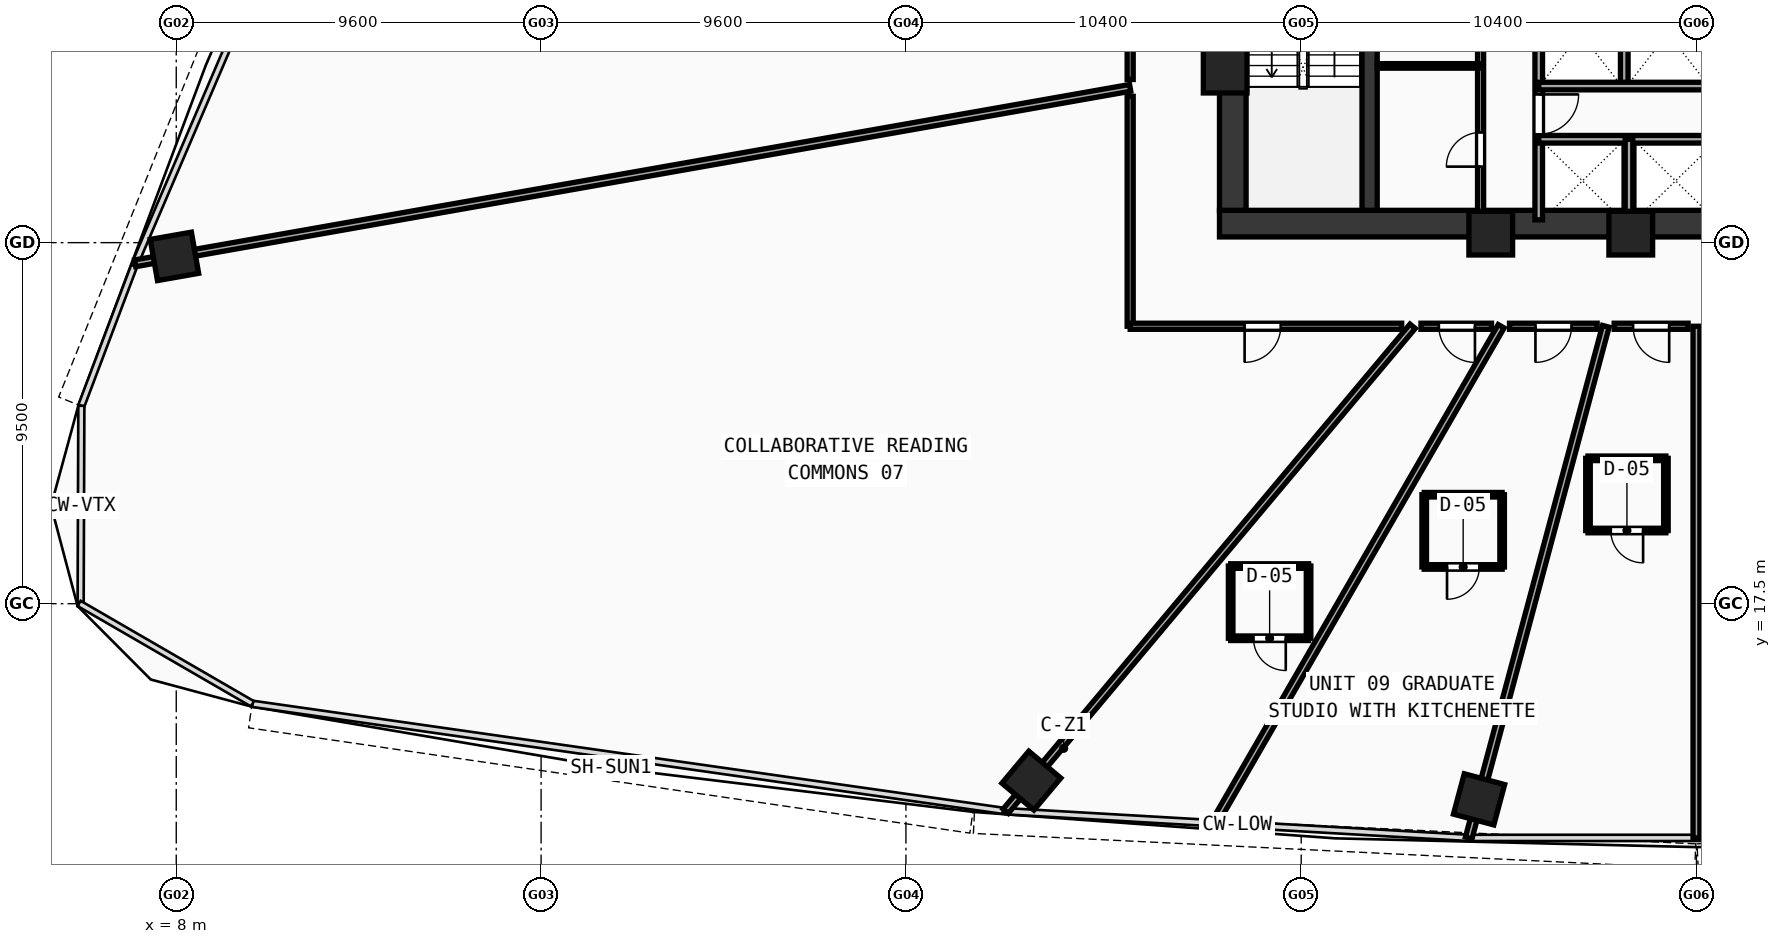
"""IFC4 building model, lengths in metres.
Left out: names, types, materials, properties, quantities, classifications, styles, units other than length and angle.
Written with IfcOpenShell. Run it as: python <this file> out.ifc"""

import sys

from ifc_helpers import new_model, si_unit, direction, frame, frame_2d, origin, origin_with_axes, origin_2d, place, context, subcontext, project, spatial, rectangle, hollow_rectangle, extrude, source, transform, mapped, element, fill, save


model = new_model("IFC4")
c1 = context("Model", 3, precision=1e-05, world=origin(), true_north=direction((0.0, 1.0)))
c2 = subcontext(c1, "Body", "Model", "MODEL_VIEW")
j1 = project(units=[si_unit("LENGTHUNIT", "METRE"), si_unit("PLANEANGLEUNIT", "RADIAN")], contexts=[c1])
p1 = place(None, origin())
s1 = spatial("IfcSite", under=j1, at=p1, CompositionType="ELEMENT")
p2 = place(p1, origin())
s2 = spatial("IfcBuilding", under=s1, at=p2, CompositionType="ELEMENT")
p3 = place(p2, frame((0.0, 0.0, 66.7)))
s3 = spatial("IfcBuildingStorey", under=s2, at=p3, CompositionType="ELEMENT", Elevation=66.7)
p4 = place(p3, frame((35.45, 27.5, 0.0), z_axis=(0.0, 0.0, 1.0), x_axis=(1.0, 0.0, 0.0)))
e1 = element("IfcWall", 1, at=p4, inside=s3, PredefinedType="SHEAR", context=c2, shape_type="SweptSolid", body=[
    extrude(rectangle(XDim=25.1, YDim=0.7, at=frame_2d((12.55, 0.0))), origin(), (0.0, 0.0, 1.0), 3.37),
])
p5 = place(p3, frame((35.8, 27.85, 0.0), z_axis=(0.0, 0.0, 1.0), x_axis=(0.0, 1.0, 0.0)))
e2 = element("IfcWall", 2, at=p5, inside=s3, PredefinedType="SHEAR", context=c2, shape_type="SweptSolid", body=[
    extrude(rectangle(XDim=12.0, YDim=0.7, at=frame_2d((6.0, 0.0))), origin(), (0.0, 0.0, 1.0), 3.37),
])
p6 = place(p3, frame((39.4, 27.85, 0.0), z_axis=(0.0, 0.0, 1.0), x_axis=(0.0, 1.0, 0.0)))
e3 = element("IfcWall", 3, at=p6, inside=s3, PredefinedType="SHEAR", context=c2, shape_type="SweptSolid", body=[
    extrude(rectangle(XDim=12.0, YDim=0.4, at=frame_2d((6.0, 0.0))), origin(), (0.0, 0.0, 1.0), 3.37),
])
p7 = place(p6, frame((9.9, 0.0, 0.0)))
e4 = element("IfcOpeningElement", 4, at=p7, cuts=e3, PredefinedType="OPENING", context=c2, shape_type="SweptSolid", body=[
    extrude(rectangle(XDim=1.1, YDim=2.1, at=frame_2d((0.55, 1.05))), frame((0.0, 0.21, 0.0), z_axis=(0.0, -1.0, 0.0), x_axis=(1.0, 0.0, 0.0)), (0.0, 0.0, 1.0), 0.42),
])
m1 = source(origin(), c2, "Body", "SweptSolid", [
    extrude(hollow_rectangle(XDim=1.15, YDim=1.15, WallThickness=0.048, at=origin_2d()), origin(), (0.0, 0.0, 1.0), 3.63),
])
for number, where, z_axis, x_axis in (
    (5, (42.588, 27.25, -0.26), (0.0, 0.0, 1.0), (1.0, 0.0, 0.0)),
    (6, (46.272, 27.25, -0.26), (0.0, 0.0, 1.0), (1.0, 0.0, 0.0)),
    (7, (35.6, 31.513, -0.26), (0.0, 0.0, 1.0), (1.0, 0.0, 0.0)),
):
    element("IfcColumn", number, at=place(p3, frame(where, z_axis=z_axis, x_axis=x_axis)), inside=s3, PredefinedType="COLUMN", context=c2, shape_type="MappedRepresentation", body=[
        mapped(m1, transform((0.0, 0.0, 0.0), scale=1.0)),
    ])
m2 = source(origin(), c2, "Body", "SweptSolid", [
    extrude(hollow_rectangle(XDim=1.1, YDim=1.1, WallThickness=0.045, at=origin_2d()), origin(), (0.0, 0.0, 1.0), 3.63),
])
for number, where, z_axis, x_axis in (
    (8, (30.5, 12.844, -0.26), (0.0, 0.0, 1.0), (0.766, -0.643, 0.0)),
    (9, (42.28, 12.352, -0.26), (0.0, 0.0, 1.0), (0.966, -0.259, 0.0)),
    (10, (7.952, 26.638, -0.26), (0.0, 0.0, 1.0), (0.174, -0.985, 0.0)),
):
    element("IfcColumn", number, at=place(p3, frame(where, z_axis=z_axis, x_axis=x_axis)), inside=s3, PredefinedType="COLUMN", context=c2, shape_type="MappedRepresentation", body=[
        mapped(m2, transform((0.0, 0.0, 0.0), scale=1.0)),
    ])
p8 = place(p3, frame((43.85, 27.6, 0.0), z_axis=(0.0, 0.0, 1.0), x_axis=(0.0, 1.0, 0.0)))
e11 = element("IfcWall", 11, at=p8, inside=s3, PredefinedType="SOLIDWALL", context=c2, shape_type="SweptSolid", body=[
    extrude(rectangle(XDim=6.22, YDim=0.2, at=frame_2d((3.11, 0.0))), origin(), (0.0, 0.0, 1.0), 3.37),
])
p9 = place(p8, frame((2.25, 0.0, 0.0)))
e12 = element("IfcOpeningElement", 12, at=p9, cuts=e11, PredefinedType="OPENING", context=c2, shape_type="SweptSolid", body=[
    extrude(rectangle(XDim=1.05, YDim=2.1, at=frame_2d((0.525, 1.05))), frame((0.0, 0.11, 0.0), z_axis=(0.0, -1.0, 0.0), x_axis=(1.0, 0.0, 0.0)), (0.0, 0.0, 1.0), 0.22),
])
p10 = place(p3, frame((46.1, 31.12, 0.0), z_axis=(0.0, 0.0, 1.0), x_axis=(0.0, 1.0, 0.0)))
e13 = element("IfcWall", 13, at=p10, inside=s3, PredefinedType="SOLIDWALL", context=c2, shape_type="SweptSolid", body=[
    extrude(rectangle(XDim=2.7, YDim=0.2, at=frame_2d((1.35, 0.0))), origin(), (0.0, 0.0, 1.0), 3.37),
])
p11 = place(p3, frame((43.85, 29.72, 0.0), z_axis=(0.0, 0.0, 1.0), x_axis=(1.0, 0.0, 0.0)))
e14 = element("IfcWall", 14, at=p11, inside=s3, PredefinedType="SOLIDWALL", context=c2, shape_type="SweptSolid", body=[
    extrude(rectangle(XDim=7.2, YDim=0.2, at=frame_2d((3.6, 0.0))), origin(), (0.0, 0.0, 1.0), 3.37),
])
p12 = place(p3, frame((43.85, 31.12, 0.0), z_axis=(0.0, 0.0, 1.0), x_axis=(1.0, 0.0, 0.0)))
e15 = element("IfcWall", 15, at=p12, inside=s3, PredefinedType="SOLIDWALL", context=c2, shape_type="SweptSolid", body=[
    extrude(rectangle(XDim=9.83, YDim=0.2, at=frame_2d((4.915, 0.0))), origin(), (0.0, 0.0, 1.0), 3.37),
])
p13 = place(p3, frame((46.225, 27.6, 0.0), z_axis=(0.0, 0.0, 1.0), x_axis=(0.0, 1.0, 0.0)))
e16 = element("IfcWall", 16, at=p13, inside=s3, PredefinedType="SOLIDWALL", context=c2, shape_type="SweptSolid", body=[
    extrude(rectangle(XDim=2.12, YDim=0.2, at=frame_2d((1.06, 0.0))), origin(), (0.0, 0.0, 1.0), 3.37),
])
p14 = place(p3, frame((42.32, 27.6, 0.0), z_axis=(0.0, 0.0, 1.0), x_axis=(0.0, 1.0, 0.0)))
e17 = element("IfcWall", 17, at=p14, inside=s3, PredefinedType="PARTITIONING", context=c2, shape_type="SweptSolid", body=[
    extrude(rectangle(XDim=5.9, YDim=0.16, at=frame_2d((2.95, 0.0))), origin(), (0.0, 0.0, 1.0), 3.37),
])
p15 = place(p14, frame((1.4, 0.0, 0.0)))
e18 = element("IfcOpeningElement", 18, at=p15, cuts=e17, PredefinedType="OPENING", context=c2, shape_type="SweptSolid", body=[
    extrude(rectangle(XDim=0.9, YDim=2.1, at=frame_2d((0.45, 1.05))), frame((0.0, 0.09, 0.0), z_axis=(0.0, -1.0, 0.0), x_axis=(1.0, 0.0, 0.0)), (0.0, 0.0, 1.0), 0.18),
])
p16 = place(p14, frame((4.45, 0.0, 0.0)))
e19 = element("IfcOpeningElement", 19, at=p16, cuts=e17, PredefinedType="OPENING", context=c2, shape_type="SweptSolid", body=[
    extrude(rectangle(XDim=0.9, YDim=2.1, at=frame_2d((0.45, 1.05))), frame((0.0, 0.09, 0.0), z_axis=(0.0, -1.0, 0.0), x_axis=(1.0, 0.0, 0.0)), (0.0, 0.0, 1.0), 0.18),
])
p17 = place(p3, frame((39.6, 31.65, 0.0), z_axis=(0.0, 0.0, 1.0), x_axis=(1.0, 0.0, 0.0)))
e20 = element("IfcWall", 20, at=p17, inside=s3, PredefinedType="PARTITIONING", context=c2, shape_type="SweptSolid", body=[
    extrude(rectangle(XDim=2.72, YDim=0.12, at=frame_2d((1.36, 0.0))), origin(), (0.0, 0.0, 1.0), 3.37),
])
p18 = place(p3, frame((33.1, 31.073, 0.0), z_axis=(0.0, 0.0, 1.0), x_axis=(-0.984808509529, -0.173643887195, 0.0)))
e21 = element("IfcWall", 21, at=p18, inside=s3, PredefinedType="PARTITIONING", context=c2, shape_type="SweptSolid", body=[
    extrude(rectangle(XDim=26.586, YDim=0.18, at=frame_2d((13.293, 0.0))), origin(), (0.0, 0.0, 1.0), 2.67),
])
p19 = place(p3, frame((40.532, 24.8, 0.0), z_axis=(0.0, 0.0, 1.0), x_axis=(-0.642782945965, -0.766048356422, 0.0)))
e22 = element("IfcWall", 22, at=p19, inside=s3, PredefinedType="PARTITIONING", context=c2, shape_type="SweptSolid", body=[
    extrude(rectangle(XDim=16.657, YDim=0.18, at=frame_2d((8.329, 0.0))), origin(), (0.0, 0.0, 1.0), 2.67),
])
p20 = place(p3, frame((42.862, 24.8, 0.0), z_axis=(0.0, 0.0, 1.0), x_axis=(-0.499994448746, -0.866028608779, 0.0)))
e23 = element("IfcWall", 23, at=p20, inside=s3, PredefinedType="PARTITIONING", context=c2, shape_type="SweptSolid", body=[
    extrude(rectangle(XDim=15.099, YDim=0.18, at=frame_2d((7.55, 0.0))), origin(), (0.0, 0.0, 1.0), 2.67),
])
p21 = place(p3, frame((45.615, 24.8, 0.0), z_axis=(0.0, 0.0, 1.0), x_axis=(-0.258819267056, -0.965925766817, 0.0)))
e24 = element("IfcWall", 24, at=p21, inside=s3, PredefinedType="PARTITIONING", context=c2, shape_type="SweptSolid", body=[
    extrude(rectangle(XDim=13.937, YDim=0.18, at=frame_2d((6.969, 0.0))), origin(), (0.0, 0.0, 1.0), 2.67),
])
p22 = place(p3, frame((48.0, 24.8, 0.0), z_axis=(0.0, 0.0, 1.0), x_axis=(0.0, -1.0, 0.0)))
e25 = element("IfcWall", 25, at=p22, inside=s3, PredefinedType="PARTITIONING", context=c2, shape_type="SweptSolid", body=[
    extrude(rectangle(XDim=13.462, YDim=0.18, at=frame_2d((6.731, 0.0))), origin(), (0.0, 0.0, 1.0), 2.67),
])
p23 = place(p3, frame((33.1, 24.8, 0.0), z_axis=(0.0, 0.0, 1.0), x_axis=(0.0, 1.0, 0.0)))
e26 = element("IfcWall", 26, at=p23, inside=s3, PredefinedType="PARTITIONING", context=c2, shape_type="SweptSolid", body=[
    extrude(rectangle(XDim=6.049, YDim=0.16, at=frame_2d((3.025, 0.0))), origin(), (0.0, 0.0, 1.0), 2.97),
])
p24 = place(p3, frame((33.1, 31.292, 0.0), z_axis=(0.0, 0.0, 1.0), x_axis=(0.0, 1.0, 0.0)))
e27 = element("IfcWall", 27, at=p24, inside=s3, PredefinedType="PARTITIONING", context=c2, shape_type="SweptSolid", body=[
    extrude(rectangle(XDim=7.029, YDim=0.16, at=frame_2d((3.515, 0.0))), origin(), (0.0, 0.0, 1.0), 3.37),
])
p25 = place(p24, frame((3.04, 0.0, 0.0)))
e28 = element("IfcOpeningElement", 28, at=p25, cuts=e27, PredefinedType="OPENING", context=c2, shape_type="SweptSolid", body=[
    extrude(rectangle(XDim=0.95, YDim=2.1, at=frame_2d((0.475, 1.05))), frame((0.0, 0.09, 0.0), z_axis=(0.0, -1.0, 0.0), x_axis=(1.0, 0.0, 0.0)), (0.0, 0.0, 1.0), 0.18),
])
p26 = place(p3, frame((47.78, 24.8, 0.0), z_axis=(0.0, 0.0, 1.0), x_axis=(-1.0, 0.0, 0.0)))
e29 = element("IfcWall", 29, at=p26, inside=s3, PredefinedType="PARTITIONING", context=c2, shape_type="SweptSolid", body=[
    extrude(rectangle(XDim=1.945, YDim=0.16, at=frame_2d((0.972, 0.0))), origin(), (0.0, 0.0, 1.0), 3.37),
])
p27 = place(p26, frame((0.497, 0.0, 0.0)))
e30 = element("IfcOpeningElement", 30, at=p27, cuts=e29, PredefinedType="OPENING", context=c2, shape_type="SweptSolid", body=[
    extrude(rectangle(XDim=0.95, YDim=2.1, at=frame_2d((0.475, 1.05))), frame((0.0, 0.09, 0.0), z_axis=(0.0, -1.0, 0.0), x_axis=(1.0, 0.0, 0.0)), (0.0, 0.0, 1.0), 0.18),
])
p28 = place(p3, frame((45.387, 24.8, 0.0), z_axis=(0.0, 0.0, 1.0), x_axis=(-1.0, 0.0, 0.0)))
e31 = element("IfcWall", 31, at=p28, inside=s3, PredefinedType="PARTITIONING", context=c2, shape_type="SweptSolid", body=[
    extrude(rectangle(XDim=2.306, YDim=0.16, at=frame_2d((1.153, 0.0))), origin(), (0.0, 0.0, 1.0), 3.37),
])
p29 = place(p28, frame((0.674, 0.0, 0.0)))
e32 = element("IfcOpeningElement", 32, at=p29, cuts=e31, PredefinedType="OPENING", context=c2, shape_type="SweptSolid", body=[
    extrude(rectangle(XDim=0.95, YDim=2.1, at=frame_2d((0.475, 1.05))), frame((0.0, 0.09, 0.0), z_axis=(0.0, -1.0, 0.0), x_axis=(1.0, 0.0, 0.0)), (0.0, 0.0, 1.0), 0.18),
])
p30 = place(p3, frame((42.608, 24.8, 0.0), z_axis=(0.0, 0.0, 1.0), x_axis=(-1.0, 0.0, 0.0)))
e33 = element("IfcWall", 33, at=p30, inside=s3, PredefinedType="PARTITIONING", context=c2, shape_type="SweptSolid", body=[
    extrude(rectangle(XDim=1.856, YDim=0.16, at=frame_2d((0.928, 0.0))), origin(), (0.0, 0.0, 1.0), 2.67),
])
p31 = place(p30, frame((0.436, 0.0, 0.0)))
e34 = element("IfcOpeningElement", 34, at=p31, cuts=e33, PredefinedType="OPENING", context=c2, shape_type="SweptSolid", body=[
    extrude(rectangle(XDim=0.95, YDim=2.1, at=frame_2d((0.475, 1.05))), frame((0.0, 0.09, 0.0), z_axis=(0.0, -1.0, 0.0), x_axis=(1.0, 0.0, 0.0)), (0.0, 0.0, 1.0), 0.18),
])
p32 = place(p3, frame((40.245, 24.8, 0.0), z_axis=(0.0, 0.0, 1.0), x_axis=(-1.0, 0.0, 0.0)))
e35 = element("IfcWall", 35, at=p32, inside=s3, PredefinedType="PARTITIONING", context=c2, shape_type="SweptSolid", body=[
    extrude(rectangle(XDim=7.145, YDim=0.16, at=frame_2d((3.572, 0.0))), origin(), (0.0, 0.0, 1.0), 2.97),
])
p33 = place(p32, frame((3.184, 0.0, 0.0)))
e36 = element("IfcOpeningElement", 36, at=p33, cuts=e35, PredefinedType="OPENING", context=c2, shape_type="SweptSolid", body=[
    extrude(rectangle(XDim=0.95, YDim=2.1, at=frame_2d((0.475, 1.05))), frame((0.0, 0.09, 0.0), z_axis=(0.0, -1.0, 0.0), x_axis=(1.0, 0.0, 0.0)), (0.0, 0.0, 1.0), 0.18),
])
p34 = place(p3, frame((35.744, 16.591, 0.0), z_axis=(0.0, 0.0, 1.0), x_axis=(1.0, 0.0, 0.0)))
e37 = element("IfcWall", 37, at=p34, inside=s3, PredefinedType="PARTITIONING", context=c2, shape_type="SweptSolid", body=[
    extrude(rectangle(XDim=2.05, YDim=0.12, at=frame_2d((1.025, 0.0))), origin(), (0.0, 0.0, 1.0), 3.37),
])
p35 = place(p34, frame((0.6, 0.0, 0.0)))
e38 = element("IfcOpeningElement", 38, at=p35, cuts=e37, PredefinedType="OPENING", context=c2, shape_type="SweptSolid", body=[
    extrude(rectangle(XDim=0.85, YDim=2.1, at=frame_2d((0.425, 1.05))), frame((0.0, 0.07, 0.0), z_axis=(0.0, -1.0, 0.0), x_axis=(1.0, 0.0, 0.0)), (0.0, 0.0, 1.0), 0.14),
])
p36 = place(p3, frame((37.794, 16.591, 0.0), z_axis=(0.0, 0.0, 1.0), x_axis=(0.0, 1.0, 0.0)))
e39 = element("IfcWall", 39, at=p36, inside=s3, PredefinedType="PARTITIONING", context=c2, shape_type="SweptSolid", body=[
    extrude(rectangle(XDim=1.9, YDim=0.12, at=frame_2d((0.95, 0.0))), origin(), (0.0, 0.0, 1.0), 2.97),
])
p37 = place(p3, frame((37.794, 18.491, 0.0), z_axis=(0.0, 0.0, 1.0), x_axis=(-1.0, 0.0, 0.0)))
e40 = element("IfcWall", 40, at=p37, inside=s3, PredefinedType="PARTITIONING", context=c2, shape_type="SweptSolid", body=[
    extrude(rectangle(XDim=2.05, YDim=0.12, at=frame_2d((1.025, 0.0))), origin(), (0.0, 0.0, 1.0), 3.37),
])
p38 = place(p3, frame((35.744, 18.491, 0.0), z_axis=(0.0, 0.0, 1.0), x_axis=(0.0, -1.0, 0.0)))
e41 = element("IfcWall", 41, at=p38, inside=s3, PredefinedType="PARTITIONING", context=c2, shape_type="SweptSolid", body=[
    extrude(rectangle(XDim=1.9, YDim=0.12, at=frame_2d((0.95, 0.0))), origin(), (0.0, 0.0, 1.0), 2.97),
])
p39 = place(p3, frame((40.837, 18.467, 0.0), z_axis=(0.0, 0.0, 1.0), x_axis=(1.0, 0.0, 0.0)))
e42 = element("IfcWall", 42, at=p39, inside=s3, PredefinedType="PARTITIONING", context=c2, shape_type="SweptSolid", body=[
    extrude(rectangle(XDim=2.05, YDim=0.12, at=frame_2d((1.025, 0.0))), origin(), (0.0, 0.0, 1.0), 3.37),
])
p40 = place(p39, frame((0.6, 0.0, 0.0)))
e43 = element("IfcOpeningElement", 43, at=p40, cuts=e42, PredefinedType="OPENING", context=c2, shape_type="SweptSolid", body=[
    extrude(rectangle(XDim=0.85, YDim=2.1, at=frame_2d((0.425, 1.05))), frame((0.0, 0.07, 0.0), z_axis=(0.0, -1.0, 0.0), x_axis=(1.0, 0.0, 0.0)), (0.0, 0.0, 1.0), 0.14),
])
p41 = place(p3, frame((42.887, 18.467, 0.0), z_axis=(0.0, 0.0, 1.0), x_axis=(0.0, 1.0, 0.0)))
e44 = element("IfcWall", 44, at=p41, inside=s3, PredefinedType="PARTITIONING", context=c2, shape_type="SweptSolid", body=[
    extrude(rectangle(XDim=1.9, YDim=0.12, at=frame_2d((0.95, 0.0))), origin(), (0.0, 0.0, 1.0), 3.37),
])
p42 = place(p3, frame((42.887, 20.367, 0.0), z_axis=(0.0, 0.0, 1.0), x_axis=(-1.0, 0.0, 0.0)))
e45 = element("IfcWall", 45, at=p42, inside=s3, PredefinedType="PARTITIONING", context=c2, shape_type="SweptSolid", body=[
    extrude(rectangle(XDim=2.05, YDim=0.12, at=frame_2d((1.025, 0.0))), origin(), (0.0, 0.0, 1.0), 3.37),
])
p43 = place(p3, frame((40.837, 20.367, 0.0), z_axis=(0.0, 0.0, 1.0), x_axis=(0.0, -1.0, 0.0)))
e46 = element("IfcWall", 46, at=p43, inside=s3, PredefinedType="PARTITIONING", context=c2, shape_type="SweptSolid", body=[
    extrude(rectangle(XDim=1.9, YDim=0.12, at=frame_2d((0.95, 0.0))), origin(), (0.0, 0.0, 1.0), 3.37),
])
p44 = place(p3, frame((45.146, 19.425, 0.0), z_axis=(0.0, 0.0, 1.0), x_axis=(1.0, 0.0, 0.0)))
e47 = element("IfcWall", 47, at=p44, inside=s3, PredefinedType="PARTITIONING", context=c2, shape_type="SweptSolid", body=[
    extrude(rectangle(XDim=2.05, YDim=0.12, at=frame_2d((1.025, 0.0))), origin(), (0.0, 0.0, 1.0), 3.37),
])
p45 = place(p44, frame((0.6, 0.0, 0.0)))
e48 = element("IfcOpeningElement", 48, at=p45, cuts=e47, PredefinedType="OPENING", context=c2, shape_type="SweptSolid", body=[
    extrude(rectangle(XDim=0.85, YDim=2.1, at=frame_2d((0.425, 1.05))), frame((0.0, 0.07, 0.0), z_axis=(0.0, -1.0, 0.0), x_axis=(1.0, 0.0, 0.0)), (0.0, 0.0, 1.0), 0.14),
])
p46 = place(p3, frame((47.196, 19.425, 0.0), z_axis=(0.0, 0.0, 1.0), x_axis=(0.0, 1.0, 0.0)))
e49 = element("IfcWall", 49, at=p46, inside=s3, PredefinedType="PARTITIONING", context=c2, shape_type="SweptSolid", body=[
    extrude(rectangle(XDim=1.9, YDim=0.12, at=frame_2d((0.95, 0.0))), origin(), (0.0, 0.0, 1.0), 3.37),
])
p47 = place(p3, frame((47.196, 21.325, 0.0), z_axis=(0.0, 0.0, 1.0), x_axis=(-1.0, 0.0, 0.0)))
e50 = element("IfcWall", 50, at=p47, inside=s3, PredefinedType="PARTITIONING", context=c2, shape_type="SweptSolid", body=[
    extrude(rectangle(XDim=2.05, YDim=0.12, at=frame_2d((1.025, 0.0))), origin(), (0.0, 0.0, 1.0), 3.37),
])
p48 = place(p3, frame((45.146, 21.325, 0.0), z_axis=(0.0, 0.0, 1.0), x_axis=(0.0, -1.0, 0.0)))
e51 = element("IfcWall", 51, at=p48, inside=s3, PredefinedType="PARTITIONING", context=c2, shape_type="SweptSolid", body=[
    extrude(rectangle(XDim=1.9, YDim=0.12, at=frame_2d((0.95, 0.0))), origin(), (0.0, 0.0, 1.0), 3.37),
])
m3 = source(origin(), c2, "Body", "SweptSolid", [
    extrude(rectangle(XDim=1.05, YDim=2.1, at=frame_2d((0.525, 1.05))), frame((0.0, 0.025, 0.0), z_axis=(0.0, -1.0, 0.0), x_axis=(1.0, 0.0, 0.0)), (0.0, 0.0, 1.0), 0.05),
])
p49 = place(p9, frame((1.05, 0.0, 0.0), z_axis=(0.0, 0.0, 1.0), x_axis=(-1.0, 0.0, 0.0)))
e52 = element("IfcDoor", 52, at=p49, inside=s3, OperationType="SINGLE_SWING_LEFT", PredefinedType="DOOR", context=c2, shape_type="MappedRepresentation", body=[
    mapped(m3, transform((0.0, 0.0, 0.0), scale=1.0)),
])
fill(e12, e52)
m4 = source(origin(), c2, "Body", "SweptSolid", [
    extrude(rectangle(XDim=0.9, YDim=2.1, at=frame_2d((0.45, 1.05))), frame((0.0, 0.025, 0.0), z_axis=(0.0, -1.0, 0.0), x_axis=(1.0, 0.0, 0.0)), (0.0, 0.0, 1.0), 0.05),
])
p50 = place(p15, origin_with_axes())
e53 = element("IfcDoor", 53, at=p50, inside=s3, OperationType="SINGLE_SWING_LEFT", PredefinedType="DOOR", context=c2, shape_type="MappedRepresentation", body=[
    mapped(m4, transform((0.0, 0.0, 0.0), scale=1.0)),
])
fill(e18, e53)
m5 = source(origin(), c2, "Body", "SweptSolid", [
    extrude(rectangle(XDim=0.95, YDim=2.1, at=frame_2d((0.475, 1.05))), frame((0.0, 0.025, 0.0), z_axis=(0.0, -1.0, 0.0), x_axis=(1.0, 0.0, 0.0)), (0.0, 0.0, 1.0), 0.05),
])
p51 = place(p33, origin_with_axes())
e54 = element("IfcDoor", 54, at=p51, inside=s3, OperationType="SINGLE_SWING_RIGHT", PredefinedType="DOOR", context=c2, shape_type="MappedRepresentation", body=[
    mapped(m5, transform((0.0, 0.0, 0.0), scale=1.0)),
])
fill(e36, e54)
p52 = place(p31, origin_with_axes())
e55 = element("IfcDoor", 55, at=p52, inside=s3, OperationType="SINGLE_SWING_LEFT", PredefinedType="DOOR", context=c2, shape_type="MappedRepresentation", body=[
    mapped(m5, transform((0.0, 0.0, 0.0), scale=1.0)),
])
fill(e34, e55)
m6 = source(origin(), c2, "Body", "SweptSolid", [
    extrude(rectangle(XDim=0.85, YDim=2.1, at=frame_2d((0.425, 1.05))), frame((0.0, 0.025, 0.0), z_axis=(0.0, -1.0, 0.0), x_axis=(1.0, 0.0, 0.0)), (0.0, 0.0, 1.0), 0.05),
])
p53 = place(p35, frame((0.85, 0.0, 0.0), z_axis=(0.0, 0.0, 1.0), x_axis=(-1.0, 0.0, 0.0)))
e56 = element("IfcDoor", 56, at=p53, inside=s3, OperationType="SINGLE_SWING_LEFT", PredefinedType="DOOR", context=c2, shape_type="MappedRepresentation", body=[
    mapped(m6, transform((0.0, 0.0, 0.0), scale=1.0)),
])
fill(e38, e56)
p54 = place(p29, origin_with_axes())
e57 = element("IfcDoor", 57, at=p54, inside=s3, OperationType="SINGLE_SWING_RIGHT", PredefinedType="DOOR", context=c2, shape_type="MappedRepresentation", body=[
    mapped(m5, transform((0.0, 0.0, 0.0), scale=1.0)),
])
fill(e32, e57)
p55 = place(p40, frame((0.85, 0.0, 0.0), z_axis=(0.0, 0.0, 1.0), x_axis=(-1.0, 0.0, 0.0)))
e58 = element("IfcDoor", 58, at=p55, inside=s3, OperationType="SINGLE_SWING_RIGHT", PredefinedType="DOOR", context=c2, shape_type="MappedRepresentation", body=[
    mapped(m6, transform((0.0, 0.0, 0.0), scale=1.0)),
])
fill(e43, e58)
p56 = place(p27, origin_with_axes())
e59 = element("IfcDoor", 59, at=p56, inside=s3, OperationType="SINGLE_SWING_LEFT", PredefinedType="DOOR", context=c2, shape_type="MappedRepresentation", body=[
    mapped(m5, transform((0.0, 0.0, 0.0), scale=1.0)),
])
fill(e30, e59)
p57 = place(p45, frame((0.85, 0.0, 0.0), z_axis=(0.0, 0.0, 1.0), x_axis=(-1.0, 0.0, 0.0)))
e60 = element("IfcDoor", 60, at=p57, inside=s3, OperationType="SINGLE_SWING_LEFT", PredefinedType="DOOR", context=c2, shape_type="MappedRepresentation", body=[
    mapped(m6, transform((0.0, 0.0, 0.0), scale=1.0)),
])
fill(e48, e60)
save(model, sys.argv[1])
